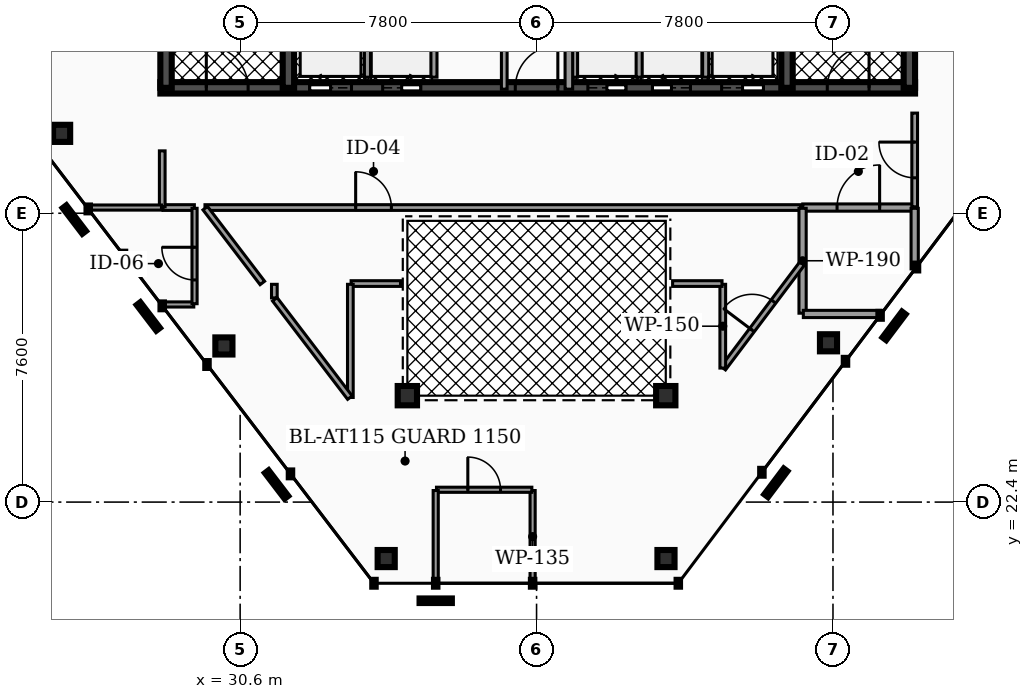
"""IFC4 building model, lengths in metres.
Left out: names, types, materials, properties, quantities, classifications, styles, units other than length and angle.
Written with IfcOpenShell. Run it as: python <this file> out.ifc"""

import sys

from ifc_helpers import new_model, si_unit, direction, frame, frame_2d, origin, origin_2d, place, context, subcontext, project, spatial, rectangle, hollow_rectangle, hollow_circle, extrude, element, fill, save


model = new_model("IFC4")
c1 = context("Model", 3, precision=1e-05, world=origin(), true_north=direction((0.0, 1.0)))
c2 = subcontext(c1, "Body", "Model", "MODEL_VIEW")
j1 = project(units=[si_unit("LENGTHUNIT", "METRE"), si_unit("PLANEANGLEUNIT", "RADIAN")], contexts=[c1])
p1 = place(None, origin())
s1 = spatial("IfcSite", under=j1, at=p1, CompositionType="ELEMENT")
p2 = place(p1, origin())
s2 = spatial("IfcBuilding", under=s1, at=p2, CompositionType="ELEMENT")
p3 = place(p2, frame((0.0, 0.0, 289.0)))
s3 = spatial("IfcBuildingStorey", under=s2, at=p3, CompositionType="ELEMENT", Elevation=289.0)
p4 = place(p3, frame((28.5, 33.3, 0.0), z_axis=(0.0, 0.0, 1.0), x_axis=(1.0, 0.0, 0.0)))
e1 = element("IfcWall", 1, at=p4, inside=s3, PredefinedType="SHEAR", context=c2, shape_type="SweptSolid", body=[
    extrude(rectangle(XDim=19.86, YDim=0.3, at=frame_2d((9.93, 0.0))), origin(), (0.0, 0.0, 1.0), 3.18),
])
p5 = place(p4, frame((3.93, 0.0, 0.0)))
e2 = element("IfcOpeningElement", 2, at=p5, cuts=e1, PredefinedType="OPENING", context=c2, shape_type="SweptSolid", body=[
    extrude(rectangle(XDim=1.1, YDim=2.15, at=frame_2d((0.55, 1.075))), frame((0.0, 0.16, 0.0), z_axis=(0.0, -1.0, 0.0), x_axis=(1.0, 0.0, 0.0)), (0.0, 0.0, 1.0), 0.32),
])
p6 = place(p4, frame((14.77, 0.0, 0.0)))
e3 = element("IfcOpeningElement", 3, at=p6, cuts=e1, PredefinedType="OPENING", context=c2, shape_type="SweptSolid", body=[
    extrude(rectangle(XDim=1.1, YDim=2.15, at=frame_2d((0.55, 1.075))), frame((0.0, 0.16, 0.0), z_axis=(0.0, -1.0, 0.0), x_axis=(1.0, 0.0, 0.0)), (0.0, 0.0, 1.0), 0.32),
])
p7 = place(p4, frame((11.25, 0.0, 0.0)))
e4 = element("IfcOpeningElement", 4, at=p7, cuts=e1, PredefinedType="OPENING", context=c2, shape_type="SweptSolid", body=[
    extrude(rectangle(XDim=1.0, YDim=2.1, at=frame_2d((0.5, 1.05))), frame((0.0, 0.16, 0.0), z_axis=(0.0, -1.0, 0.0), x_axis=(1.0, 0.0, 0.0)), (0.0, 0.0, 1.0), 0.32),
])
p8 = place(p4, frame((12.95, 0.0, 0.0)))
e5 = element("IfcOpeningElement", 5, at=p8, cuts=e1, PredefinedType="OPENING", context=c2, shape_type="SweptSolid", body=[
    extrude(rectangle(XDim=1.0, YDim=2.1, at=frame_2d((0.5, 1.05))), frame((0.0, 0.16, 0.0), z_axis=(0.0, -1.0, 0.0), x_axis=(1.0, 0.0, 0.0)), (0.0, 0.0, 1.0), 0.32),
])
p9 = place(p4, frame((5.85, 0.0, 0.0)))
e6 = element("IfcOpeningElement", 6, at=p9, cuts=e1, PredefinedType="OPENING", context=c2, shape_type="SweptSolid", body=[
    extrude(rectangle(XDim=1.0, YDim=2.1, at=frame_2d((0.5, 1.05))), frame((0.0, 0.16, 0.0), z_axis=(0.0, -1.0, 0.0), x_axis=(1.0, 0.0, 0.0)), (0.0, 0.0, 1.0), 0.32),
])
p10 = place(p4, frame((1.21, 0.0, 0.0)))
e7 = element("IfcOpeningElement", 7, at=p10, cuts=e1, PredefinedType="OPENING", context=c2, shape_type="SweptSolid", body=[
    extrude(rectangle(XDim=1.1, YDim=2.2, at=frame_2d((0.55, 1.1))), frame((0.0, 0.16, 0.0), z_axis=(0.0, -1.0, 0.0), x_axis=(1.0, 0.0, 0.0)), (0.0, 0.0, 1.0), 0.32),
])
p11 = place(p4, frame((9.34, 0.0, 0.0)))
e8 = element("IfcOpeningElement", 8, at=p11, cuts=e1, PredefinedType="OPENING", context=c2, shape_type="SweptSolid", body=[
    extrude(rectangle(XDim=1.12, YDim=2.05, at=frame_2d((0.56, 1.025))), frame((0.0, 0.16, 0.0), z_axis=(0.0, -1.0, 0.0), x_axis=(1.0, 0.0, 0.0)), (0.0, 0.0, 1.0), 0.32),
])
p12 = place(p4, frame((17.55, 0.0, 0.0)))
e9 = element("IfcOpeningElement", 9, at=p12, cuts=e1, PredefinedType="OPENING", context=c2, shape_type="SweptSolid", body=[
    extrude(rectangle(XDim=1.1, YDim=2.2, at=frame_2d((0.55, 1.1))), frame((0.0, 0.16, 0.0), z_axis=(0.0, -1.0, 0.0), x_axis=(1.0, 0.0, 0.0)), (0.0, 0.0, 1.0), 0.32),
])
for number, where, z_axis, x_axis in (
    (10, (28.65, 33.3, 0.0), (0.0, 0.0, 1.0), (0.0, 1.0, 0.0)),
    (11, (31.87, 33.3, 0.0), (0.0, 0.0, 1.0), (0.0, 1.0, 0.0)),
    (12, (44.99, 33.3, 0.0), (0.0, 0.0, 1.0), (0.0, 1.0, 0.0)),
    (13, (48.21, 33.3, 0.0), (0.0, 0.0, 1.0), (0.0, 1.0, 0.0)),
):
    element("IfcWall", number, at=place(p3, frame(where, z_axis=z_axis, x_axis=x_axis)), inside=s3, PredefinedType="SHEAR", context=c2, shape_type="SweptSolid", body=[
        extrude(rectangle(XDim=10.1, YDim=0.3, at=frame_2d((5.05, 0.0))), origin(), (0.0, 0.0, 1.0), 3.18),
    ])
for number, where, z_axis, x_axis in (
    (14, (25.902, 32.102, 0.0), (0.0, 0.0, 1.0), (1.0, 0.0, 0.0)),
    (15, (30.173, 26.508, 0.0), (0.0, 0.0, 1.0), (1.0, 0.0, 0.0)),
    (16, (34.443, 20.914, 0.0), (0.0, 0.0, 1.0), (1.0, 0.0, 0.0)),
    (17, (41.806, 20.914, 0.0), (0.0, 0.0, 1.0), (1.0, 0.0, 0.0)),
    (18, (46.082, 26.592, 0.0), (0.0, 0.0, 1.0), (1.0, 0.0, 0.0)),
):
    element("IfcColumn", number, at=place(p3, frame(where, z_axis=z_axis, x_axis=x_axis)), inside=s3, PredefinedType="COLUMN", context=c2, shape_type="SweptSolid", body=[
        extrude(hollow_rectangle(XDim=0.45, YDim=0.45, WallThickness=0.022, at=origin_2d()), origin(), (0.0, 0.0, 1.0), 3.18),
    ])
for number, where, z_axis, x_axis in (
    (19, (35.0, 25.2, 0.0), (0.0, 0.0, 1.0), (1.0, 0.0, 0.0)),
    (20, (41.8, 25.2, 0.0), (0.0, 0.0, 1.0), (1.0, 0.0, 0.0)),
):
    element("IfcColumn", number, at=place(p3, frame(where, z_axis=z_axis, x_axis=x_axis)), inside=s3, PredefinedType="COLUMN", context=c2, shape_type="SweptSolid", body=[
        extrude(hollow_circle(Radius=0.254, WallThickness=0.02, at=origin_2d()), origin(), (0.0, 0.0, 1.0), 3.18),
    ])
for number, where, z_axis, x_axis in (
    (21, (33.95, 33.58, 0.0), (0.0, 0.0, 1.0), (0.0, 1.0, 0.0)),
    (22, (42.85, 33.58, 0.0), (0.0, 0.0, 1.0), (0.0, 1.0, 0.0)),
):
    element("IfcWall", number, at=place(p3, frame(where, z_axis=z_axis, x_axis=x_axis)), inside=s3, PredefinedType="SOLIDWALL", context=c2, shape_type="SweptSolid", body=[
        extrude(rectangle(XDim=2.45, YDim=0.16, at=frame_2d((1.225, 0.0))), origin(), (0.0, 0.0, 1.0), 3.18),
    ])
for number, where, z_axis, x_axis in (
    (23, (39.4, 33.58, 0.0), (0.0, 0.0, 1.0), (0.0, 1.0, 0.0)),
    (24, (41.1, 33.58, 0.0), (0.0, 0.0, 1.0), (0.0, 1.0, 0.0)),
    (25, (35.7, 33.58, 0.0), (0.0, 0.0, 1.0), (0.0, 1.0, 0.0)),
):
    element("IfcWall", number, at=place(p3, frame(where, z_axis=z_axis, x_axis=x_axis)), inside=s3, PredefinedType="SOLIDWALL", context=c2, shape_type="SweptSolid", body=[
        extrude(rectangle(XDim=2.25, YDim=0.16, at=frame_2d((1.125, 0.0))), origin(), (0.0, 0.0, 1.0), 3.18),
    ])
p13 = place(p3, frame((37.55, 33.265, 0.0), z_axis=(0.0, 0.0, 1.0), x_axis=(0.0, 1.0, 0.0)))
e26 = element("IfcWall", 26, at=p13, inside=s3, PredefinedType="PARTITIONING", context=c2, shape_type="SweptSolid", body=[
    extrude(rectangle(XDim=3.615, YDim=0.15, at=frame_2d((1.808, 0.0))), origin(), (0.0, 0.0, 1.0), 2.235),
])
p14 = place(p13, frame((1.337, 0.0, 0.0)))
e27 = element("IfcOpeningElement", 27, at=p14, cuts=e26, PredefinedType="OPENING", context=c2, shape_type="SweptSolid", body=[
    extrude(rectangle(XDim=0.94, YDim=2.05, at=frame_2d((0.47, 1.025))), frame((0.0, 0.085, 0.0), z_axis=(0.0, -1.0, 0.0), x_axis=(1.0, 0.0, 0.0)), (0.0, 0.0, 1.0), 0.17),
])
p15 = place(p3, frame((39.25, 33.265, 0.0), z_axis=(0.0, 0.0, 1.0), x_axis=(0.0, 1.0, 0.0)))
e28 = element("IfcWall", 28, at=p15, inside=s3, PredefinedType="PARTITIONING", context=c2, shape_type="SweptSolid", body=[
    extrude(rectangle(XDim=3.615, YDim=0.2, at=frame_2d((1.808, 0.0))), origin(), (0.0, 0.0, 1.0), 2.235),
])
p16 = place(p3, frame((45.405, 30.15, 0.0), z_axis=(0.0, 0.0, 1.0), x_axis=(1.0, 0.0, 0.0)))
e29 = element("IfcWall", 29, at=p16, inside=s3, PredefinedType="PARTITIONING", context=c2, shape_type="SweptSolid", body=[
    extrude(rectangle(XDim=2.925, YDim=0.19, at=frame_2d((1.462, 0.0))), origin(), (0.0, 0.0, 1.0), 2.235),
])
p17 = place(p16, frame((0.903, 0.0, 0.0)))
e30 = element("IfcOpeningElement", 30, at=p17, cuts=e29, PredefinedType="OPENING", context=c2, shape_type="SweptSolid", body=[
    extrude(rectangle(XDim=1.12, YDim=2.05, at=frame_2d((0.56, 1.025))), frame((0.0, 0.105, 0.0), z_axis=(0.0, -1.0, 0.0), x_axis=(1.0, 0.0, 0.0)), (0.0, 0.0, 1.0), 0.21),
])
p18 = place(p3, frame((29.675, 30.15, 0.0), z_axis=(0.0, 0.0, 1.0), x_axis=(1.0, 0.0, 0.0)))
e31 = element("IfcWall", 31, at=p18, inside=s3, PredefinedType="PARTITIONING", context=c2, shape_type="SweptSolid", body=[
    extrude(rectangle(XDim=15.67, YDim=0.15, at=frame_2d((7.835, 0.0))), origin(), (0.0, 0.0, 1.0), 2.235),
])
p19 = place(p18, frame((3.965, 0.0, 0.0)))
e32 = element("IfcOpeningElement", 32, at=p19, cuts=e31, PredefinedType="OPENING", context=c2, shape_type="SweptSolid", body=[
    extrude(rectangle(XDim=0.94, YDim=2.05, at=frame_2d((0.47, 1.025))), frame((0.0, 0.085, 0.0), z_axis=(0.0, -1.0, 0.0), x_axis=(1.0, 0.0, 0.0)), (0.0, 0.0, 1.0), 0.17),
])
p20 = place(p3, frame((28.57, 30.15, 0.0), z_axis=(0.0, 0.0, 1.0), x_axis=(1.0, 0.0, 0.0)))
e33 = element("IfcWall", 33, at=p20, inside=s3, PredefinedType="PARTITIONING", context=c2, shape_type="SweptSolid", body=[
    extrude(rectangle(XDim=0.825, YDim=0.15, at=frame_2d((0.413, 0.0))), origin(), (0.0, 0.0, 1.0), 2.235),
])
p21 = place(p3, frame((28.55, 30.17, 0.0), z_axis=(0.0, 0.0, 1.0), x_axis=(0.0, 1.0, 0.0)))
e34 = element("IfcWall", 34, at=p21, inside=s3, PredefinedType="PARTITIONING", context=c2, shape_type="SweptSolid", body=[
    extrude(rectangle(XDim=1.471, YDim=0.15, at=frame_2d((0.736, 0.0))), origin(), (0.0, 0.0, 1.0), 2.235),
])
p22 = place(p3, frame((48.35, 30.17, 0.0), z_axis=(0.0, 0.0, 1.0), x_axis=(0.0, 1.0, 0.0)))
e35 = element("IfcWall", 35, at=p22, inside=s3, PredefinedType="PARTITIONING", context=c2, shape_type="SweptSolid", body=[
    extrude(rectangle(XDim=2.465, YDim=0.15, at=frame_2d((1.233, 0.0))), origin(), (0.0, 0.0, 1.0), 2.235),
])
p23 = place(p22, frame((0.763, 0.0, 0.0)))
e36 = element("IfcOpeningElement", 36, at=p23, cuts=e35, PredefinedType="OPENING", context=c2, shape_type="SweptSolid", body=[
    extrude(rectangle(XDim=0.94, YDim=2.05, at=frame_2d((0.47, 1.025))), frame((0.0, 0.085, 0.0), z_axis=(0.0, -1.0, 0.0), x_axis=(1.0, 0.0, 0.0)), (0.0, 0.0, 1.0), 0.17),
])
p24 = place(p3, frame((45.4, 27.37, 0.0), z_axis=(0.0, 0.0, 1.0), x_axis=(0.0, 1.0, 0.0)))
e37 = element("IfcWall", 37, at=p24, inside=s3, PredefinedType="PARTITIONING", context=c2, shape_type="SweptSolid", body=[
    extrude(rectangle(XDim=2.76, YDim=0.19, at=frame_2d((1.38, 0.0))), origin(), (0.0, 0.0, 1.0), 2.235),
])
p25 = place(p3, frame((45.42, 27.35, 0.0), z_axis=(0.0, 0.0, 1.0), x_axis=(1.0, 0.0, 0.0)))
e38 = element("IfcWall", 38, at=p25, inside=s3, PredefinedType="PARTITIONING", context=c2, shape_type="SweptSolid", body=[
    extrude(rectangle(XDim=2.032, YDim=0.19, at=frame_2d((1.016, 0.0))), origin(), (0.0, 0.0, 1.0), 2.235),
])
p26 = place(p3, frame((48.35, 28.537, 0.0), z_axis=(0.0, 0.0, 1.0), x_axis=(0.0, 1.0, 0.0)))
e39 = element("IfcWall", 39, at=p26, inside=s3, PredefinedType="PARTITIONING", context=c2, shape_type="SweptSolid", body=[
    extrude(rectangle(XDim=1.593, YDim=0.19, at=frame_2d((0.797, 0.0))), origin(), (0.0, 0.0, 1.0), 2.235),
])
p27 = place(p3, frame((43.312, 25.922, 0.0), z_axis=(0.0, 0.0, 1.0), x_axis=(0.60171699977, 0.798709366533, 0.0)))
e40 = element("IfcWall", 40, at=p27, inside=s3, PredefinedType="PARTITIONING", context=c2, shape_type="SweptSolid", body=[
    extrude(rectangle(XDim=3.455, YDim=0.15, at=frame_2d((1.728, 0.0))), origin(), (0.0, 0.0, 1.0), 2.235),
])
p28 = place(p27, frame((1.258, 0.0, 0.0)))
e41 = element("IfcOpeningElement", 41, at=p28, cuts=e40, PredefinedType="OPENING", context=c2, shape_type="SweptSolid", body=[
    extrude(rectangle(XDim=0.94, YDim=2.05, at=frame_2d((0.47, 1.025))), frame((0.0, 0.085, 0.0), z_axis=(0.0, -1.0, 0.0), x_axis=(1.0, 0.0, 0.0)), (0.0, 0.0, 1.0), 0.17),
])
p29 = place(p3, frame((43.3, 25.926, 0.0), z_axis=(0.0, 0.0, 1.0), x_axis=(0.0, 1.0, 0.0)))
e42 = element("IfcWall", 42, at=p29, inside=s3, PredefinedType="PARTITIONING", context=c2, shape_type="SweptSolid", body=[
    extrude(rectangle(XDim=2.204, YDim=0.15, at=frame_2d((1.102, 0.0))), origin(), (0.0, 0.0, 1.0), 2.235),
])
for number, where, z_axis, x_axis in (
    (43, (41.98, 28.15, 0.0), (0.0, 0.0, 1.0), (1.0, 0.0, 0.0)),
    (44, (33.52, 28.15, 0.0), (0.0, 0.0, 1.0), (1.0, 0.0, 0.0)),
):
    element("IfcWall", number, at=place(p3, frame(where, z_axis=z_axis, x_axis=x_axis)), inside=s3, PredefinedType="PARTITIONING", context=c2, shape_type="SweptSolid", body=[
        extrude(rectangle(XDim=1.3, YDim=0.15, at=frame_2d((0.65, 0.0))), origin(), (0.0, 0.0, 1.0), 2.235),
    ])
p30 = place(p3, frame((33.5, 25.153, 0.0), z_axis=(0.0, 0.0, 1.0), x_axis=(0.0, 1.0, 0.0)))
e45 = element("IfcWall", 45, at=p30, inside=s3, PredefinedType="PARTITIONING", context=c2, shape_type="SweptSolid", body=[
    extrude(rectangle(XDim=2.977, YDim=0.15, at=frame_2d((1.489, 0.0))), origin(), (0.0, 0.0, 1.0), 2.235),
])
p31 = place(p3, frame((31.512, 27.736, 0.0), z_axis=(0.0, 0.0, 1.0), x_axis=(0.606793028784, -0.794859874581, 0.0)))
e46 = element("IfcWall", 46, at=p31, inside=s3, PredefinedType="PARTITIONING", context=c2, shape_type="SweptSolid", body=[
    extrude(rectangle(XDim=3.256, YDim=0.15, at=frame_2d((1.628, 0.0))), origin(), (0.0, 0.0, 1.0), 2.235),
])
p32 = place(p3, frame((31.5, 27.772, 0.0), z_axis=(0.0, 0.0, 1.0), x_axis=(0.0, 1.0, 0.0)))
e47 = element("IfcWall", 47, at=p32, inside=s3, PredefinedType="PARTITIONING", context=c2, shape_type="SweptSolid", body=[
    extrude(rectangle(XDim=0.358, YDim=0.15, at=frame_2d((0.179, 0.0))), origin(), (0.0, 0.0, 1.0), 2.235),
])
p33 = place(p3, frame((29.682, 30.134, 0.0), z_axis=(0.0, 0.0, 1.0), x_axis=(0.60687170499, -0.794799807299, 0.0)))
e48 = element("IfcWall", 48, at=p33, inside=s3, PredefinedType="PARTITIONING", context=c2, shape_type="SweptSolid", body=[
    extrude(rectangle(XDim=2.476, YDim=0.15, at=frame_2d((1.238, 0.0))), origin(), (0.0, 0.0, 1.0), 2.235),
])
p34 = place(p3, frame((28.536, 27.6, 0.0), z_axis=(0.0, 0.0, 1.0), x_axis=(1.0, 0.0, 0.0)))
e49 = element("IfcWall", 49, at=p34, inside=s3, PredefinedType="PARTITIONING", context=c2, shape_type="SweptSolid", body=[
    extrude(rectangle(XDim=0.844, YDim=0.135, at=frame_2d((0.422, 0.0))), origin(), (0.0, 0.0, 1.0), 2.235),
])
p35 = place(p3, frame((29.4, 27.62, 0.0), z_axis=(0.0, 0.0, 1.0), x_axis=(0.0, 1.0, 0.0)))
e50 = element("IfcWall", 50, at=p35, inside=s3, PredefinedType="PARTITIONING", context=c2, shape_type="SweptSolid", body=[
    extrude(rectangle(XDim=2.51, YDim=0.135, at=frame_2d((1.255, 0.0))), origin(), (0.0, 0.0, 1.0), 2.235),
])
p36 = place(p35, frame((0.625, 0.0, 0.0)))
e51 = element("IfcOpeningElement", 51, at=p36, cuts=e50, PredefinedType="OPENING", context=c2, shape_type="SweptSolid", body=[
    extrude(rectangle(XDim=0.86, YDim=2.05, at=frame_2d((0.43, 1.025))), frame((0.0, 0.077, 0.0), z_axis=(0.0, -1.0, 0.0), x_axis=(1.0, 0.0, 0.0)), (0.0, 0.0, 1.0), 0.155),
])
p37 = place(p3, frame((38.296, 20.279, 0.0), z_axis=(0.0, 0.0, 1.0), x_axis=(0.0, 1.0, 0.0)))
e52 = element("IfcWall", 52, at=p37, inside=s3, PredefinedType="PARTITIONING", context=c2, shape_type="SweptSolid", body=[
    extrude(rectangle(XDim=2.425, YDim=0.135, at=frame_2d((1.212, 0.0))), origin(), (0.0, 0.0, 1.0), 2.235),
])
p38 = place(p3, frame((35.766, 22.724, 0.0), z_axis=(0.0, 0.0, 1.0), x_axis=(1.0, 0.0, 0.0)))
e53 = element("IfcWall", 53, at=p38, inside=s3, PredefinedType="PARTITIONING", context=c2, shape_type="SweptSolid", body=[
    extrude(rectangle(XDim=2.51, YDim=0.135, at=frame_2d((1.255, 0.0))), origin(), (0.0, 0.0, 1.0), 2.235),
])
p39 = place(p38, frame((0.825, 0.0, 0.0)))
e54 = element("IfcOpeningElement", 54, at=p39, cuts=e53, PredefinedType="OPENING", context=c2, shape_type="SweptSolid", body=[
    extrude(rectangle(XDim=0.86, YDim=2.05, at=frame_2d((0.43, 1.025))), frame((0.0, 0.077, 0.0), z_axis=(0.0, -1.0, 0.0), x_axis=(1.0, 0.0, 0.0)), (0.0, 0.0, 1.0), 0.155),
])
p40 = place(p3, frame((35.746, 20.279, 0.0), z_axis=(0.0, 0.0, 1.0), x_axis=(0.0, 1.0, 0.0)))
e55 = element("IfcWall", 55, at=p40, inside=s3, PredefinedType="PARTITIONING", context=c2, shape_type="SweptSolid", body=[
    extrude(rectangle(XDim=2.425, YDim=0.135, at=frame_2d((1.212, 0.0))), origin(), (0.0, 0.0, 1.0), 2.235),
])
p41 = place(p3, frame((26.59, 30.15, 0.0), z_axis=(0.0, 0.0, 1.0), x_axis=(1.0, 0.0, 0.0)))
e56 = element("IfcWall", 56, at=p41, inside=s3, PredefinedType="PARTITIONING", context=c2, shape_type="SweptSolid", body=[
    extrude(rectangle(XDim=1.94, YDim=0.135, at=frame_2d((0.97, 0.0))), origin(), (0.0, 0.0, 1.0), 2.235),
])
p42 = place(p5, origin())
e57 = element("IfcDoor", 57, at=p42, inside=s3, OperationType="SLIDING_TO_LEFT", PredefinedType="DOOR", context=c2, shape_type="SweptSolid", body=[
    extrude(rectangle(XDim=1.1, YDim=2.15, at=frame_2d((0.55, 1.075))), frame((0.0, 0.025, 0.0), z_axis=(0.0, -1.0, 0.0), x_axis=(1.0, 0.0, 0.0)), (0.0, 0.0, 1.0), 0.05),
])
fill(e2, e57)
p43 = place(p6, origin())
e58 = element("IfcDoor", 58, at=p43, inside=s3, OperationType="SLIDING_TO_RIGHT", PredefinedType="DOOR", context=c2, shape_type="SweptSolid", body=[
    extrude(rectangle(XDim=1.1, YDim=2.15, at=frame_2d((0.55, 1.075))), frame((0.0, 0.025, 0.0), z_axis=(0.0, -1.0, 0.0), x_axis=(1.0, 0.0, 0.0)), (0.0, 0.0, 1.0), 0.05),
])
fill(e3, e58)
p44 = place(p7, origin())
e59 = element("IfcDoor", 59, at=p44, inside=s3, OperationType="SLIDING_TO_RIGHT", PredefinedType="DOOR", context=c2, shape_type="SweptSolid", body=[
    extrude(rectangle(XDim=1.0, YDim=2.1, at=frame_2d((0.5, 1.05))), frame((0.0, 0.025, 0.0), z_axis=(0.0, -1.0, 0.0), x_axis=(1.0, 0.0, 0.0)), (0.0, 0.0, 1.0), 0.05),
])
fill(e4, e59)
p45 = place(p8, origin())
e60 = element("IfcDoor", 60, at=p45, inside=s3, OperationType="SLIDING_TO_LEFT", PredefinedType="DOOR", context=c2, shape_type="SweptSolid", body=[
    extrude(rectangle(XDim=1.0, YDim=2.1, at=frame_2d((0.5, 1.05))), frame((0.0, 0.025, 0.0), z_axis=(0.0, -1.0, 0.0), x_axis=(1.0, 0.0, 0.0)), (0.0, 0.0, 1.0), 0.05),
])
fill(e5, e60)
p46 = place(p9, origin())
e61 = element("IfcDoor", 61, at=p46, inside=s3, OperationType="SLIDING_TO_RIGHT", PredefinedType="DOOR", context=c2, shape_type="SweptSolid", body=[
    extrude(rectangle(XDim=1.0, YDim=2.1, at=frame_2d((0.5, 1.05))), frame((0.0, 0.025, 0.0), z_axis=(0.0, -1.0, 0.0), x_axis=(1.0, 0.0, 0.0)), (0.0, 0.0, 1.0), 0.05),
])
fill(e6, e61)
p47 = place(p10, origin())
e62 = element("IfcDoor", 62, at=p47, inside=s3, OperationType="SINGLE_SWING_LEFT", PredefinedType="DOOR", context=c2, shape_type="SweptSolid", body=[
    extrude(rectangle(XDim=1.1, YDim=2.2, at=frame_2d((0.55, 1.1))), frame((0.0, 0.025, 0.0), z_axis=(0.0, -1.0, 0.0), x_axis=(1.0, 0.0, 0.0)), (0.0, 0.0, 1.0), 0.05),
])
fill(e7, e62)
p48 = place(p11, origin())
e63 = element("IfcDoor", 63, at=p48, inside=s3, OperationType="SINGLE_SWING_RIGHT", PredefinedType="DOOR", context=c2, shape_type="SweptSolid", body=[
    extrude(rectangle(XDim=1.12, YDim=2.05, at=frame_2d((0.56, 1.025))), frame((0.0, 0.025, 0.0), z_axis=(0.0, -1.0, 0.0), x_axis=(1.0, 0.0, 0.0)), (0.0, 0.0, 1.0), 0.05),
])
fill(e8, e63)
p49 = place(p12, origin())
e64 = element("IfcDoor", 64, at=p49, inside=s3, OperationType="SINGLE_SWING_RIGHT", PredefinedType="DOOR", context=c2, shape_type="SweptSolid", body=[
    extrude(rectangle(XDim=1.1, YDim=2.2, at=frame_2d((0.55, 1.1))), frame((0.0, 0.025, 0.0), z_axis=(0.0, -1.0, 0.0), x_axis=(1.0, 0.0, 0.0)), (0.0, 0.0, 1.0), 0.05),
])
fill(e9, e64)
p50 = place(p17, origin())
e65 = element("IfcDoor", 65, at=p50, inside=s3, OperationType="SINGLE_SWING_RIGHT", PredefinedType="DOOR", context=c2, shape_type="SweptSolid", body=[
    extrude(rectangle(XDim=1.12, YDim=2.05, at=frame_2d((0.56, 1.025))), frame((0.0, 0.025, 0.0), z_axis=(0.0, -1.0, 0.0), x_axis=(1.0, 0.0, 0.0)), (0.0, 0.0, 1.0), 0.05),
])
fill(e30, e65)
p51 = place(p19, origin())
e66 = element("IfcDoor", 66, at=p51, inside=s3, OperationType="SINGLE_SWING_LEFT", PredefinedType="DOOR", context=c2, shape_type="SweptSolid", body=[
    extrude(rectangle(XDim=0.94, YDim=2.05, at=frame_2d((0.47, 1.025))), frame((0.0, 0.025, 0.0), z_axis=(0.0, -1.0, 0.0), x_axis=(1.0, 0.0, 0.0)), (0.0, 0.0, 1.0), 0.05),
])
fill(e32, e66)
p52 = place(p23, origin())
e67 = element("IfcDoor", 67, at=p52, inside=s3, OperationType="SINGLE_SWING_RIGHT", PredefinedType="DOOR", context=c2, shape_type="SweptSolid", body=[
    extrude(rectangle(XDim=0.94, YDim=2.05, at=frame_2d((0.47, 1.025))), frame((0.0, 0.025, 0.0), z_axis=(0.0, -1.0, 0.0), x_axis=(1.0, 0.0, 0.0)), (0.0, 0.0, 1.0), 0.05),
])
fill(e36, e67)
p53 = place(p28, origin())
e68 = element("IfcDoor", 68, at=p53, inside=s3, OperationType="SINGLE_SWING_LEFT", PredefinedType="DOOR", context=c2, shape_type="SweptSolid", body=[
    extrude(rectangle(XDim=0.94, YDim=2.05, at=frame_2d((0.47, 1.025))), frame((0.0, 0.025, 0.0), z_axis=(0.0, -1.0, 0.0), x_axis=(1.0, 0.0, 0.0)), (0.0, 0.0, 1.0), 0.05),
])
fill(e41, e68)
p54 = place(p36, origin())
e69 = element("IfcDoor", 69, at=p54, inside=s3, OperationType="SINGLE_SWING_RIGHT", PredefinedType="DOOR", context=c2, shape_type="SweptSolid", body=[
    extrude(rectangle(XDim=0.86, YDim=2.05, at=frame_2d((0.43, 1.025))), frame((0.0, 0.025, 0.0), z_axis=(0.0, -1.0, 0.0), x_axis=(1.0, 0.0, 0.0)), (0.0, 0.0, 1.0), 0.05),
])
fill(e51, e69)
p55 = place(p39, origin())
e70 = element("IfcDoor", 70, at=p55, inside=s3, OperationType="SINGLE_SWING_LEFT", PredefinedType="DOOR", context=c2, shape_type="SweptSolid", body=[
    extrude(rectangle(XDim=0.86, YDim=2.05, at=frame_2d((0.43, 1.025))), frame((0.0, 0.025, 0.0), z_axis=(0.0, -1.0, 0.0), x_axis=(1.0, 0.0, 0.0)), (0.0, 0.0, 1.0), 0.05),
])
fill(e54, e70)
save(model, sys.argv[1])
